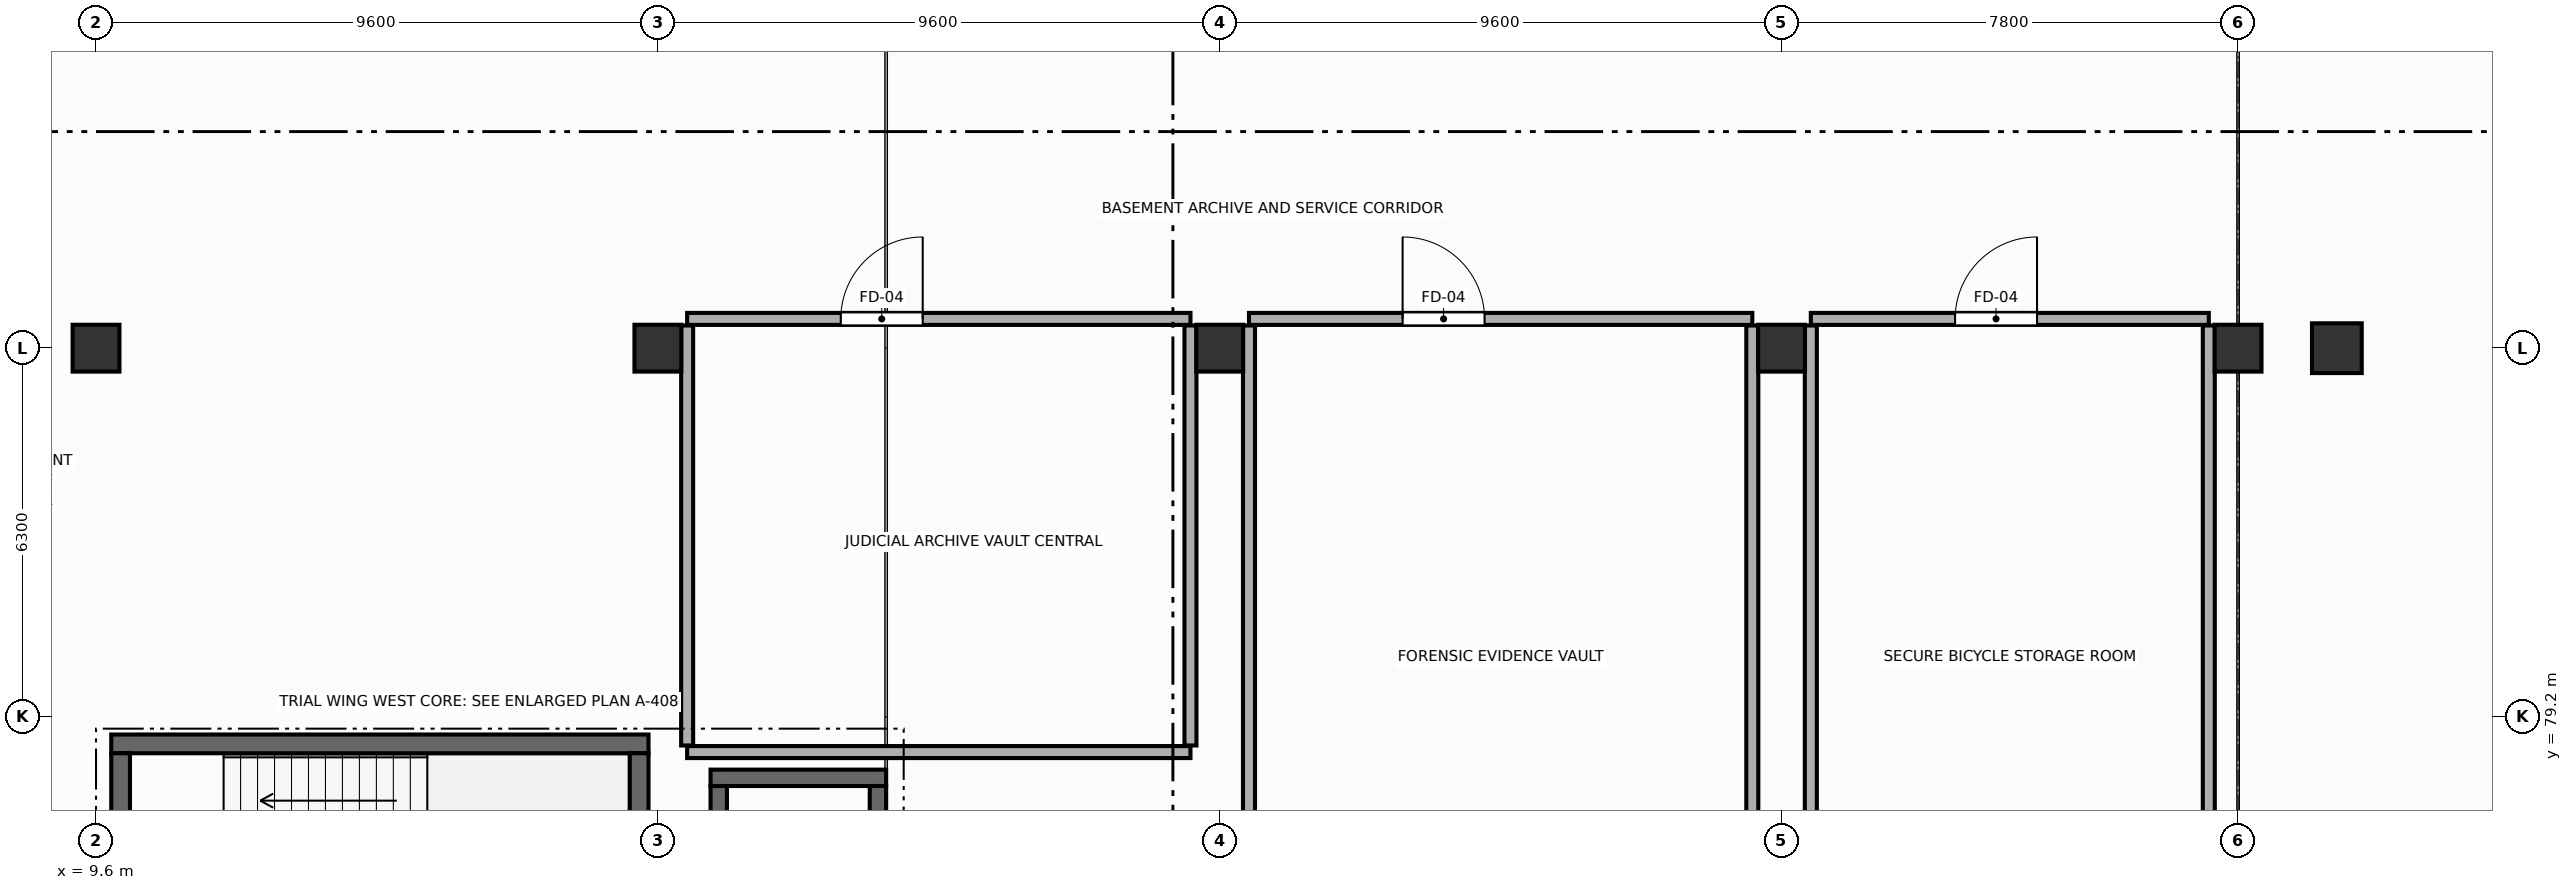
"""IFC4 building model, lengths in metres.
Left out: names, types, materials, properties, quantities, classifications, styles, units other than length and angle.
Written with IfcOpenShell. Run it as: python <this file> out.ifc"""

import sys

from ifc_helpers import new_model, si_unit, direction, frame, frame_2d, origin, origin_2d, place, context, subcontext, project, spatial, rectangle, circle, extrude, element, fill, save


model = new_model("IFC4")
c1 = context("Model", 3, precision=1e-05, world=origin(), true_north=direction((0.0, 1.0)))
c2 = subcontext(c1, "Body", "Model", "MODEL_VIEW")
j1 = project(units=[si_unit("LENGTHUNIT", "METRE"), si_unit("PLANEANGLEUNIT", "RADIAN")], contexts=[c1])
p1 = place(None, origin())
s1 = spatial("IfcSite", under=j1, at=p1, CompositionType="ELEMENT")
p2 = place(p1, origin())
s2 = spatial("IfcBuilding", under=s1, at=p2, CompositionType="ELEMENT")
p3 = place(p2, frame((0.0, 0.0, -4.8)))
s3 = spatial("IfcBuildingStorey", under=s2, at=p3, CompositionType="ELEMENT", Elevation=-4.8)
p4 = place(p3, frame((47.888, 85.5, -0.42), z_axis=(0.0, 0.0, 1.0), x_axis=(1.0, 0.0, 0.0)))
e1 = element("IfcColumn", 1, at=p4, inside=s3, PredefinedType="COLUMN", context=c2, shape_type="SweptSolid", body=[
    extrude(circle(Radius=0.425, at=origin_2d()), origin(), (0.0, 0.0, 1.0), 5.22),
])
for number, where, z_axis, x_axis in (
    (2, (9.6, 85.5, -0.42), (0.0, 0.0, 1.0), (1.0, 0.0, 0.0)),
    (3, (19.2, 85.5, -0.42), (0.0, 0.0, 1.0), (1.0, 0.0, 0.0)),
    (4, (28.8, 85.5, -0.42), (0.0, 0.0, 1.0), (1.0, 0.0, 0.0)),
    (5, (38.4, 85.5, -0.42), (0.0, 0.0, 1.0), (1.0, 0.0, 0.0)),
    (6, (46.2, 85.5, -0.42), (0.0, 0.0, 1.0), (1.0, 0.0, 0.0)),
):
    element("IfcColumn", number, at=place(p3, frame(where, z_axis=z_axis, x_axis=x_axis)), inside=s3, PredefinedType="COLUMN", context=c2, shape_type="SweptSolid", body=[
        extrude(rectangle(XDim=0.8, YDim=0.8, at=origin_2d()), origin(), (0.0, 0.0, 1.0), 5.22),
    ])
p5 = place(p3, frame((9.86, 78.74, -0.42), z_axis=(0.0, 0.0, 1.0), x_axis=(1.0, 0.0, 0.0)))
e7 = element("IfcWall", 7, at=p5, inside=s3, PredefinedType="SHEAR", context=c2, shape_type="SweptSolid", body=[
    extrude(rectangle(XDim=9.18, YDim=0.32, at=frame_2d((4.59, 0.0))), origin(), (0.0, 0.0, 1.0), 4.94),
])
p6 = place(p3, frame((10.02, 75.18, -0.42), z_axis=(0.0, 0.0, 1.0), x_axis=(0.0, 1.0, 0.0)))
e8 = element("IfcWall", 8, at=p6, inside=s3, PredefinedType="SHEAR", context=c2, shape_type="SweptSolid", body=[
    extrude(rectangle(XDim=3.4, YDim=0.32, at=frame_2d((1.7, 0.0))), origin(), (0.0, 0.0, 1.0), 4.94),
])
p7 = place(p6, frame((1.125, 0.0, 0.42)))
e9 = element("IfcOpeningElement", 9, at=p7, cuts=e8, PredefinedType="OPENING", context=c2, shape_type="SweptSolid", body=[
    extrude(rectangle(XDim=1.15, YDim=2.2, at=frame_2d((0.575, 1.1))), frame((0.0, 0.17, 0.0), z_axis=(0.0, -1.0, 0.0), x_axis=(1.0, 0.0, 0.0)), (0.0, 0.0, 1.0), 0.34),
])
p8 = place(p3, frame((18.88, 78.58, -0.42), z_axis=(0.0, 0.0, 1.0), x_axis=(0.0, -1.0, 0.0)))
e10 = element("IfcWall", 10, at=p8, inside=s3, PredefinedType="SHEAR", context=c2, shape_type="SweptSolid", body=[
    extrude(rectangle(XDim=3.4, YDim=0.32, at=frame_2d((1.7, 0.0))), origin(), (0.0, 0.0, 1.0), 4.94),
])
p9 = place(p3, frame((20.1, 78.16, -0.42), z_axis=(0.0, 0.0, 1.0), x_axis=(1.0, 0.0, 0.0)))
e11 = element("IfcWall", 11, at=p9, inside=s3, PredefinedType="SHEAR", context=c2, shape_type="SweptSolid", body=[
    extrude(rectangle(XDim=3.0, YDim=0.28, at=frame_2d((1.5, 0.0))), origin(), (0.0, 0.0, 1.0), 4.94),
])
for number, where, z_axis, x_axis in (
    (12, (20.24, 75.18, -0.42), (0.0, 0.0, 1.0), (0.0, 1.0, 0.0)),
    (13, (22.96, 78.02, -0.42), (0.0, 0.0, 1.0), (0.0, -1.0, 0.0)),
):
    element("IfcWall", number, at=place(p3, frame(where, z_axis=z_axis, x_axis=x_axis)), inside=s3, PredefinedType="SHEAR", context=c2, shape_type="SweptSolid", body=[
        extrude(rectangle(XDim=2.84, YDim=0.28, at=frame_2d((1.42, 0.0))), origin(), (0.0, 0.0, 1.0), 4.94),
    ])
p10 = place(p3, frame((19.7, 86.0, 0.0), z_axis=(0.0, 0.0, 1.0), x_axis=(1.0, 0.0, 0.0)))
e14 = element("IfcWall", 14, at=p10, inside=s3, PredefinedType="STANDARD", context=c2, shape_type="SweptSolid", body=[
    extrude(rectangle(XDim=8.6, YDim=0.205, at=frame_2d((4.3, 0.0))), origin(), (0.0, 0.0, 1.0), 4.505),
])
p11 = place(p10, frame((2.625, 0.0, 0.0)))
e15 = element("IfcOpeningElement", 15, at=p11, cuts=e14, PredefinedType="OPENING", context=c2, shape_type="SweptSolid", body=[
    extrude(rectangle(XDim=1.4, YDim=2.25, at=frame_2d((0.7, 1.125))), frame((0.0, 0.113, 0.0), z_axis=(0.0, -1.0, 0.0), x_axis=(1.0, 0.0, 0.0)), (0.0, 0.0, 1.0), 0.225),
])
p12 = place(p3, frame((28.3, 78.6, 0.0), z_axis=(0.0, 0.0, 1.0), x_axis=(-1.0, 0.0, 0.0)))
e16 = element("IfcWall", 16, at=p12, inside=s3, PredefinedType="STANDARD", context=c2, shape_type="SweptSolid", body=[
    extrude(rectangle(XDim=8.6, YDim=0.205, at=frame_2d((4.3, 0.0))), origin(), (0.0, 0.0, 1.0), 4.505),
])
for number, where, z_axis, x_axis in (
    (17, (19.7, 78.712, 0.0), (0.0, 0.0, 1.0), (0.0, 1.0, 0.0)),
    (18, (28.3, 85.887, 0.0), (0.0, 0.0, 1.0), (0.0, -1.0, 0.0)),
):
    element("IfcWall", number, at=place(p3, frame(where, z_axis=z_axis, x_axis=x_axis)), inside=s3, PredefinedType="STANDARD", context=c2, shape_type="SweptSolid", body=[
        extrude(rectangle(XDim=7.175, YDim=0.205, at=frame_2d((3.587, 0.0))), origin(), (0.0, 0.0, 1.0), 3.75),
    ])
p13 = place(p3, frame((29.3, 86.0, 0.0), z_axis=(0.0, 0.0, 1.0), x_axis=(1.0, 0.0, 0.0)))
e19 = element("IfcWall", 19, at=p13, inside=s3, PredefinedType="STANDARD", context=c2, shape_type="SweptSolid", body=[
    extrude(rectangle(XDim=8.6, YDim=0.205, at=frame_2d((4.3, 0.0))), origin(), (0.0, 0.0, 1.0), 4.505),
])
p14 = place(p13, frame((2.625, 0.0, 0.0)))
e20 = element("IfcOpeningElement", 20, at=p14, cuts=e19, PredefinedType="OPENING", context=c2, shape_type="SweptSolid", body=[
    extrude(rectangle(XDim=1.4, YDim=2.25, at=frame_2d((0.7, 1.125))), frame((0.0, 0.113, 0.0), z_axis=(0.0, -1.0, 0.0), x_axis=(1.0, 0.0, 0.0)), (0.0, 0.0, 1.0), 0.225),
])
for number, where, z_axis, x_axis in (
    (21, (29.3, 75.113, 0.0), (0.0, 0.0, 1.0), (0.0, 1.0, 0.0)),
    (22, (37.9, 85.887, 0.0), (0.0, 0.0, 1.0), (0.0, -1.0, 0.0)),
):
    element("IfcWall", number, at=place(p3, frame(where, z_axis=z_axis, x_axis=x_axis)), inside=s3, PredefinedType="STANDARD", context=c2, shape_type="SweptSolid", body=[
        extrude(rectangle(XDim=10.775, YDim=0.205, at=frame_2d((5.387, 0.0))), origin(), (0.0, 0.0, 1.0), 3.75),
    ])
p15 = place(p3, frame((38.9, 86.0, 0.0), z_axis=(0.0, 0.0, 1.0), x_axis=(1.0, 0.0, 0.0)))
e23 = element("IfcWall", 23, at=p15, inside=s3, PredefinedType="STANDARD", context=c2, shape_type="SweptSolid", body=[
    extrude(rectangle(XDim=6.8, YDim=0.205, at=frame_2d((3.4, 0.0))), origin(), (0.0, 0.0, 1.0), 4.505),
])
p16 = place(p15, frame((2.465, 0.0, 0.0)))
e24 = element("IfcOpeningElement", 24, at=p16, cuts=e23, PredefinedType="OPENING", context=c2, shape_type="SweptSolid", body=[
    extrude(rectangle(XDim=1.4, YDim=2.25, at=frame_2d((0.7, 1.125))), frame((0.0, 0.113, 0.0), z_axis=(0.0, -1.0, 0.0), x_axis=(1.0, 0.0, 0.0)), (0.0, 0.0, 1.0), 0.225),
])
for number, where, z_axis, x_axis in (
    (25, (38.9, 75.113, 0.0), (0.0, 0.0, 1.0), (0.0, 1.0, 0.0)),
    (26, (45.7, 85.887, 0.0), (0.0, 0.0, 1.0), (0.0, -1.0, 0.0)),
):
    element("IfcWall", number, at=place(p3, frame(where, z_axis=z_axis, x_axis=x_axis)), inside=s3, PredefinedType="STANDARD", context=c2, shape_type="SweptSolid", body=[
        extrude(rectangle(XDim=10.775, YDim=0.205, at=frame_2d((5.387, 0.0))), origin(), (0.0, 0.0, 1.0), 3.85),
    ])
p17 = place(p11, origin())
e27 = element("IfcDoor", 27, at=p17, inside=s3, OperationType="SINGLE_SWING_RIGHT", PredefinedType="DOOR", context=c2, shape_type="SweptSolid", body=[
    extrude(rectangle(XDim=1.4, YDim=2.25, at=frame_2d((0.7, 1.125))), frame((0.0, 0.025, 0.0), z_axis=(0.0, -1.0, 0.0), x_axis=(1.0, 0.0, 0.0)), (0.0, 0.0, 1.0), 0.05),
])
fill(e15, e27)
p18 = place(p14, origin())
e28 = element("IfcDoor", 28, at=p18, inside=s3, OperationType="SINGLE_SWING_LEFT", PredefinedType="DOOR", context=c2, shape_type="SweptSolid", body=[
    extrude(rectangle(XDim=1.4, YDim=2.25, at=frame_2d((0.7, 1.125))), frame((0.0, 0.025, 0.0), z_axis=(0.0, -1.0, 0.0), x_axis=(1.0, 0.0, 0.0)), (0.0, 0.0, 1.0), 0.05),
])
fill(e20, e28)
p19 = place(p16, origin())
e29 = element("IfcDoor", 29, at=p19, inside=s3, OperationType="SINGLE_SWING_RIGHT", PredefinedType="DOOR", context=c2, shape_type="SweptSolid", body=[
    extrude(rectangle(XDim=1.4, YDim=2.25, at=frame_2d((0.7, 1.125))), frame((0.0, 0.025, 0.0), z_axis=(0.0, -1.0, 0.0), x_axis=(1.0, 0.0, 0.0)), (0.0, 0.0, 1.0), 0.05),
])
fill(e24, e29)
save(model, sys.argv[1])
